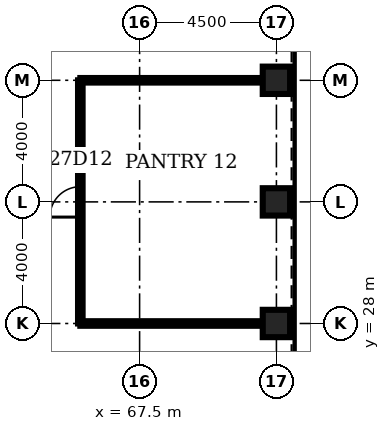
"""IFC4 building model, lengths in metres.
Left out: names, types, materials, properties, quantities, classifications, styles, units other than length and angle.
Written with IfcOpenShell. Run it as: python <this file> out.ifc"""

import sys

from ifc_helpers import new_model, si_unit, direction, frame, frame_2d, origin, origin_2d, place, context, subcontext, project, spatial, rectangle, hollow_rectangle, extrude, element, fill, save


model = new_model("IFC4")
c1 = context("Model", 3, precision=1e-05, world=origin(), true_north=direction((0.0, 1.0)))
c2 = subcontext(c1, "Body", "Model", "MODEL_VIEW")
j1 = project(units=[si_unit("LENGTHUNIT", "METRE"), si_unit("PLANEANGLEUNIT", "RADIAN")], contexts=[c1])
p1 = place(None, origin())
s1 = spatial("IfcSite", under=j1, at=p1, CompositionType="ELEMENT")
p2 = place(p1, origin())
s2 = spatial("IfcBuilding", under=s1, at=p2, CompositionType="ELEMENT")
p3 = place(p2, frame((0.0, 0.0, 125.7)))
s3 = spatial("IfcBuildingStorey", under=s2, at=p3, CompositionType="ELEMENT", Elevation=125.7)
for number, where, z_axis, x_axis in (
    (1, (72.0, 28.0, 0.0), (0.0, 0.0, 1.0), (1.0, 0.0, 0.0)),
    (2, (72.0, 32.0, 0.0), (0.0, 0.0, 1.0), (1.0, 0.0, 0.0)),
    (3, (72.0, 36.0, 0.0), (0.0, 0.0, 1.0), (1.0, 0.0, 0.0)),
):
    element("IfcColumn", number, at=place(p3, frame(where, z_axis=z_axis, x_axis=x_axis)), inside=s3, PredefinedType="COLUMN", context=c2, shape_type="SweptSolid", body=[
        extrude(hollow_rectangle(XDim=0.9, YDim=0.9, WallThickness=0.1, at=origin_2d()), origin(), (0.0, 0.0, 1.0), 4.2),
    ])
for number, where, z_axis, x_axis in (
    (4, (65.55, 28.0, 0.0), (0.0, 0.0, 1.0), (1.0, 0.0, 0.0)),
    (5, (65.55, 36.0, 0.0), (0.0, 0.0, 1.0), (1.0, 0.0, 0.0)),
):
    element("IfcWall", number, at=place(p3, frame(where, z_axis=z_axis, x_axis=x_axis)), inside=s3, PredefinedType="PARTITIONING", context=c2, shape_type="SweptSolid", body=[
        extrude(rectangle(XDim=6.0, YDim=0.15, at=frame_2d((3.0, 0.0))), origin(), (0.0, 0.0, 1.0), 3.0),
    ])
p4 = place(p3, frame((65.55, 28.0, 0.0), z_axis=(0.0, 0.0, 1.0), x_axis=(0.0, 1.0, 0.0)))
e6 = element("IfcWall", 6, at=p4, inside=s3, PredefinedType="PARTITIONING", context=c2, shape_type="SweptSolid", body=[
    extrude(rectangle(XDim=8.0, YDim=0.15, at=frame_2d((4.0, 0.0))), origin(), (0.0, 0.0, 1.0), 3.0),
])
p5 = place(p4, frame((3.5, 0.0, 0.0)))
e7 = element("IfcOpeningElement", 7, at=p5, cuts=e6, PredefinedType="OPENING", context=c2, shape_type="SweptSolid", body=[
    extrude(rectangle(XDim=1.0, YDim=2.1, at=frame_2d((0.5, 1.05))), frame((0.0, 0.085, 0.0), z_axis=(0.0, -1.0, 0.0), x_axis=(1.0, 0.0, 0.0)), (0.0, 0.0, 1.0), 0.17),
])
p6 = place(p5, origin())
e8 = element("IfcDoor", 8, at=p6, inside=s3, OperationType="SINGLE_SWING_LEFT", PredefinedType="DOOR", context=c2, shape_type="SweptSolid", body=[
    extrude(rectangle(XDim=1.0, YDim=2.1, at=frame_2d((0.5, 1.05))), frame((0.0, 0.025, 0.0), z_axis=(0.0, -1.0, 0.0), x_axis=(1.0, 0.0, 0.0)), (0.0, 0.0, 1.0), 0.05),
])
fill(e7, e8)
save(model, sys.argv[1])
